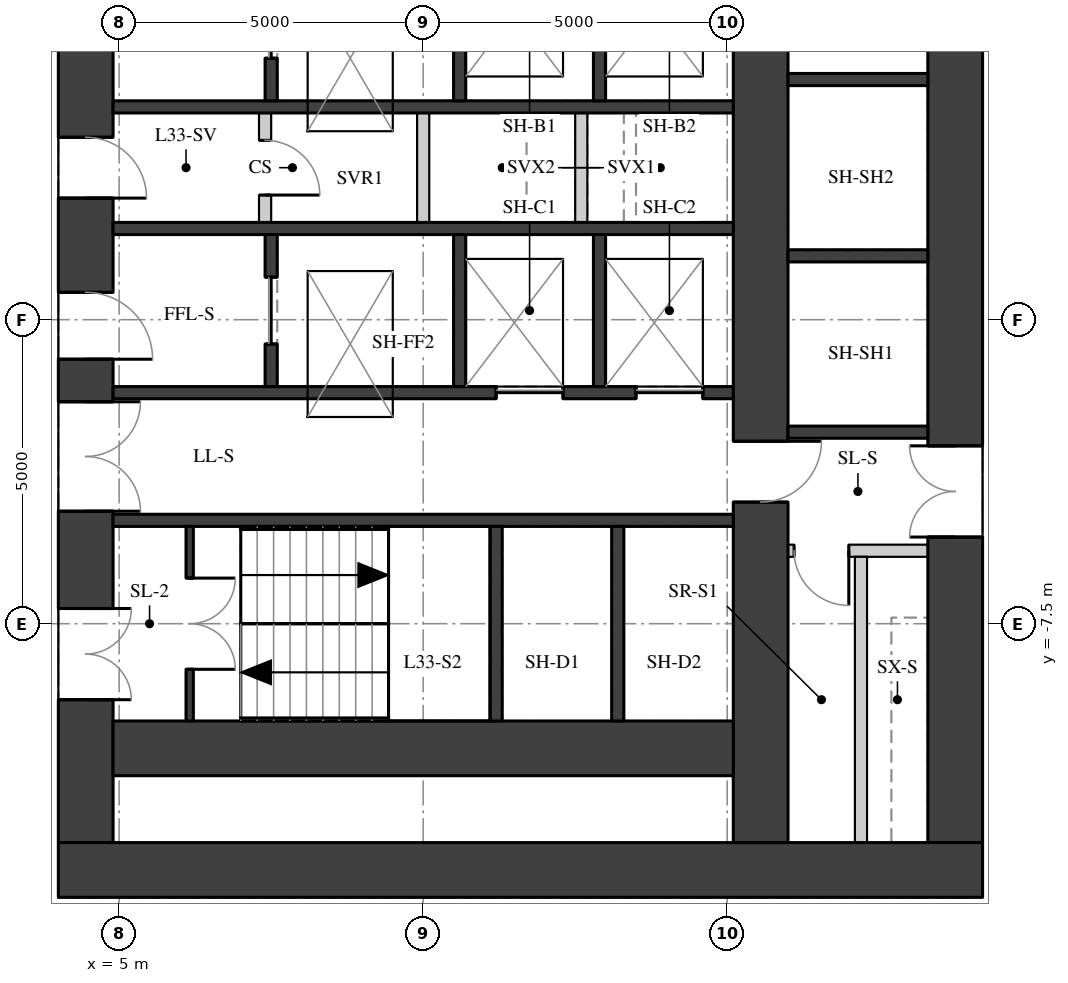
"""IFC4 building model, lengths in metres.
Left out: names, types, materials, properties, quantities, classifications, styles, units other than length and angle.
Written with IfcOpenShell. Run it as: python <this file> out.ifc"""

import sys

from ifc_helpers import new_model, si_unit, direction, frame, frame_2d, origin, place, context, subcontext, project, spatial, rectangle, extrude, element, fill, save


model = new_model("IFC4")
c1 = context("Model", 3, precision=1e-05, world=origin(), true_north=direction((0.0, 1.0)))
c2 = subcontext(c1, "Body", "Model", "MODEL_VIEW")
j1 = project(units=[si_unit("LENGTHUNIT", "METRE"), si_unit("PLANEANGLEUNIT", "RADIAN")], contexts=[c1])
p1 = place(None, origin())
s1 = spatial("IfcSite", under=j1, at=p1, CompositionType="ELEMENT")
p2 = place(p1, origin())
s2 = spatial("IfcBuilding", under=s1, at=p2, CompositionType="ELEMENT")
p3 = place(p2, frame((0.0, 0.0, 118.6)))
s3 = spatial("IfcBuildingStorey", under=s2, at=p3, CompositionType="ELEMENT", Elevation=118.6)
p4 = place(p3, frame((4.45, -11.1, 0.0), z_axis=(0.0, 0.0, 1.0), x_axis=(0.0, 1.0, 0.0)))
e1 = element("IfcWall", 1, at=p4, inside=s3, PredefinedType="SHEAR", context=c2, shape_type="SweptSolid", body=[
    extrude(rectangle(XDim=22.2, YDim=0.9, at=frame_2d((11.1, 0.0))), origin(), (0.0, 0.0, 1.0), 3.02),
])
p5 = place(p4, frame((2.35, 0.0, 0.0)))
e2 = element("IfcOpeningElement", 2, at=p5, cuts=e1, PredefinedType="OPENING", context=c2, shape_type="SweptSolid", body=[
    extrude(rectangle(XDim=1.5, YDim=2.1, at=frame_2d((0.75, 1.05))), frame((0.0, 0.46, 0.0), z_axis=(0.0, -1.0, 0.0), x_axis=(1.0, 0.0, 0.0)), (0.0, 0.0, 1.0), 0.92),
])
p6 = place(p4, frame((5.45, 0.0, 0.0)))
e3 = element("IfcOpeningElement", 3, at=p6, cuts=e1, PredefinedType="OPENING", context=c2, shape_type="SweptSolid", body=[
    extrude(rectangle(XDim=1.8, YDim=2.1, at=frame_2d((0.9, 1.05))), frame((0.0, 0.46, 0.0), z_axis=(0.0, -1.0, 0.0), x_axis=(1.0, 0.0, 0.0)), (0.0, 0.0, 1.0), 0.92),
])
p7 = place(p4, frame((7.95, 0.0, 0.0)))
e4 = element("IfcOpeningElement", 4, at=p7, cuts=e1, PredefinedType="OPENING", context=c2, shape_type="SweptSolid", body=[
    extrude(rectangle(XDim=1.1, YDim=2.1, at=frame_2d((0.55, 1.05))), frame((0.0, 0.46, 0.0), z_axis=(0.0, -1.0, 0.0), x_axis=(1.0, 0.0, 0.0)), (0.0, 0.0, 1.0), 0.92),
])
p8 = place(p4, frame((10.6, 0.0, 0.0)))
e5 = element("IfcOpeningElement", 5, at=p8, cuts=e1, PredefinedType="OPENING", context=c2, shape_type="SweptSolid", body=[
    extrude(rectangle(XDim=1.0, YDim=2.1, at=frame_2d((0.5, 1.05))), frame((0.0, 0.46, 0.0), z_axis=(0.0, -1.0, 0.0), x_axis=(1.0, 0.0, 0.0)), (0.0, 0.0, 1.0), 0.92),
])
p9 = place(p4, frame((13.15, 0.0, 0.0)))
e6 = element("IfcOpeningElement", 6, at=p9, cuts=e1, PredefinedType="OPENING", context=c2, shape_type="SweptSolid", body=[
    extrude(rectangle(XDim=1.1, YDim=2.1, at=frame_2d((0.55, 1.05))), frame((0.0, 0.46, 0.0), z_axis=(0.0, -1.0, 0.0), x_axis=(1.0, 0.0, 0.0)), (0.0, 0.0, 1.0), 0.92),
])
p10 = place(p4, frame((14.95, 0.0, 0.0)))
e7 = element("IfcOpeningElement", 7, at=p10, cuts=e1, PredefinedType="OPENING", context=c2, shape_type="SweptSolid", body=[
    extrude(rectangle(XDim=1.8, YDim=2.1, at=frame_2d((0.9, 1.05))), frame((0.0, 0.46, 0.0), z_axis=(0.0, -1.0, 0.0), x_axis=(1.0, 0.0, 0.0)), (0.0, 0.0, 1.0), 0.92),
])
p11 = place(p4, frame((18.35, 0.0, 0.0)))
e8 = element("IfcOpeningElement", 8, at=p11, cuts=e1, PredefinedType="OPENING", context=c2, shape_type="SweptSolid", body=[
    extrude(rectangle(XDim=1.5, YDim=2.1, at=frame_2d((0.75, 1.05))), frame((0.0, 0.46, 0.0), z_axis=(0.0, -1.0, 0.0), x_axis=(1.0, 0.0, 0.0)), (0.0, 0.0, 1.0), 0.92),
])
p12 = place(p3, frame((18.75, -11.1, 0.0), z_axis=(0.0, 0.0, 1.0), x_axis=(0.0, 1.0, 0.0)))
e9 = element("IfcWall", 9, at=p12, inside=s3, PredefinedType="SHEAR", context=c2, shape_type="SweptSolid", body=[
    extrude(rectangle(XDim=22.2, YDim=0.9, at=frame_2d((11.1, 0.0))), origin(), (0.0, 0.0, 1.0), 3.02),
])
p13 = place(p12, frame((16.175, 0.0, 0.0)))
e10 = element("IfcOpeningElement", 10, at=p13, cuts=e9, PredefinedType="OPENING", context=c2, shape_type="SweptSolid", body=[
    extrude(rectangle(XDim=1.5, YDim=2.1, at=frame_2d((0.75, 1.05))), frame((0.0, 0.46, 0.0), z_axis=(0.0, -1.0, 0.0), x_axis=(1.0, 0.0, 0.0)), (0.0, 0.0, 1.0), 0.92),
])
p14 = place(p12, frame((5.025, 0.0, 0.0)))
e11 = element("IfcOpeningElement", 11, at=p14, cuts=e9, PredefinedType="OPENING", context=c2, shape_type="SweptSolid", body=[
    extrude(rectangle(XDim=1.5, YDim=2.1, at=frame_2d((0.75, 1.05))), frame((0.0, 0.46, 0.0), z_axis=(0.0, -1.0, 0.0), x_axis=(1.0, 0.0, 0.0)), (0.0, 0.0, 1.0), 0.92),
])
p15 = place(p3, frame((4.0, -11.55, 0.0), z_axis=(0.0, 0.0, 1.0), x_axis=(1.0, 0.0, 0.0)))
e12 = element("IfcWall", 12, at=p15, inside=s3, PredefinedType="SHEAR", context=c2, shape_type="SweptSolid", body=[
    extrude(rectangle(XDim=15.2, YDim=0.9, at=frame_2d((7.6, 0.0))), origin(), (0.0, 0.0, 1.0), 3.02),
])
p16 = place(p3, frame((15.55, -11.1, 0.0), z_axis=(0.0, 0.0, 1.0), x_axis=(0.0, 1.0, 0.0)))
e13 = element("IfcWall", 13, at=p16, inside=s3, PredefinedType="SHEAR", context=c2, shape_type="SweptSolid", body=[
    extrude(rectangle(XDim=22.2, YDim=0.9, at=frame_2d((11.1, 0.0))), origin(), (0.0, 0.0, 1.0), 3.02),
])
p17 = place(p16, frame((15.6, 0.0, 0.0)))
e14 = element("IfcOpeningElement", 14, at=p17, cuts=e13, PredefinedType="OPENING", context=c2, shape_type="SweptSolid", body=[
    extrude(rectangle(XDim=1.0, YDim=2.1, at=frame_2d((0.5, 1.05))), frame((0.0, 0.46, 0.0), z_axis=(0.0, -1.0, 0.0), x_axis=(1.0, 0.0, 0.0)), (0.0, 0.0, 1.0), 0.92),
])
p18 = place(p16, frame((5.6, 0.0, 0.0)))
e15 = element("IfcOpeningElement", 15, at=p18, cuts=e13, PredefinedType="OPENING", context=c2, shape_type="SweptSolid", body=[
    extrude(rectangle(XDim=1.0, YDim=2.1, at=frame_2d((0.5, 1.05))), frame((0.0, 0.46, 0.0), z_axis=(0.0, -1.0, 0.0), x_axis=(1.0, 0.0, 0.0)), (0.0, 0.0, 1.0), 0.92),
])
p19 = place(p3, frame((4.9, -9.55, 0.0), z_axis=(0.0, 0.0, 1.0), x_axis=(1.0, 0.0, 0.0)))
e16 = element("IfcWall", 16, at=p19, inside=s3, PredefinedType="SHEAR", context=c2, shape_type="SweptSolid", body=[
    extrude(rectangle(XDim=10.2, YDim=0.9, at=frame_2d((5.1, 0.0))), origin(), (0.0, 0.0, 1.0), 3.02),
])
for number, where, z_axis, x_axis in (
    (17, (4.9, 1.0, 0.0), (0.0, 0.0, 1.0), (1.0, 0.0, 0.0)),
    (18, (4.9, -1.0, 0.0), (0.0, 0.0, 1.0), (1.0, 0.0, 0.0)),
):
    element("IfcWall", number, at=place(p3, frame(where, z_axis=z_axis, x_axis=x_axis)), inside=s3, PredefinedType="SHEAR", context=c2, shape_type="SweptSolid", body=[
        extrude(rectangle(XDim=10.2, YDim=0.2, at=frame_2d((5.1, 0.0))), origin(), (0.0, 0.0, 1.0), 3.02),
    ])
p20 = place(p3, frame((4.9, -3.7, 0.0), z_axis=(0.0, 0.0, 1.0), x_axis=(1.0, 0.0, 0.0)))
e19 = element("IfcWall", 19, at=p20, inside=s3, PredefinedType="SHEAR", context=c2, shape_type="SweptSolid", body=[
    extrude(rectangle(XDim=10.2, YDim=0.2, at=frame_2d((5.1, 0.0))), origin(), (0.0, 0.0, 1.0), 3.02),
])
p21 = place(p20, frame((6.3, 0.0, 0.0)))
e20 = element("IfcOpeningElement", 20, at=p21, cuts=e19, PredefinedType="OPENING", context=c2, shape_type="SweptSolid", body=[
    extrude(rectangle(XDim=1.1, YDim=2.1, at=frame_2d((0.55, 1.05))), frame((0.0, 0.11, 0.0), z_axis=(0.0, -1.0, 0.0), x_axis=(1.0, 0.0, 0.0)), (0.0, 0.0, 1.0), 0.22),
])
p22 = place(p20, frame((8.6, 0.0, 0.0)))
e21 = element("IfcOpeningElement", 21, at=p22, cuts=e19, PredefinedType="OPENING", context=c2, shape_type="SweptSolid", body=[
    extrude(rectangle(XDim=1.1, YDim=2.1, at=frame_2d((0.55, 1.05))), frame((0.0, 0.11, 0.0), z_axis=(0.0, -1.0, 0.0), x_axis=(1.0, 0.0, 0.0)), (0.0, 0.0, 1.0), 0.22),
])
p23 = place(p3, frame((4.9, -5.8, 0.0), z_axis=(0.0, 0.0, 1.0), x_axis=(1.0, 0.0, 0.0)))
e22 = element("IfcWall", 22, at=p23, inside=s3, PredefinedType="SHEAR", context=c2, shape_type="SweptSolid", body=[
    extrude(rectangle(XDim=10.2, YDim=0.2, at=frame_2d((5.1, 0.0))), origin(), (0.0, 0.0, 1.0), 3.02),
])
for number, where, z_axis, x_axis in (
    (23, (11.2, -9.1, 0.0), (0.0, 0.0, 1.0), (0.0, 1.0, 0.0)),
    (24, (13.2, -9.1, 0.0), (0.0, 0.0, 1.0), (0.0, 1.0, 0.0)),
):
    element("IfcWall", number, at=place(p3, frame(where, z_axis=z_axis, x_axis=x_axis)), inside=s3, PredefinedType="SHEAR", context=c2, shape_type="SweptSolid", body=[
        extrude(rectangle(XDim=3.2, YDim=0.2, at=frame_2d((1.6, 0.0))), origin(), (0.0, 0.0, 1.0), 3.02),
    ])
p24 = place(p3, frame((7.5, 1.1, 0.0), z_axis=(0.0, 0.0, 1.0), x_axis=(0.0, 1.0, 0.0)))
e25 = element("IfcWall", 25, at=p24, inside=s3, PredefinedType="SHEAR", context=c2, shape_type="SweptSolid", body=[
    extrude(rectangle(XDim=2.5, YDim=0.2, at=frame_2d((1.25, 0.0))), origin(), (0.0, 0.0, 1.0), 3.02),
])
p25 = place(p24, frame((0.7, 0.0, 0.0)))
e26 = element("IfcOpeningElement", 26, at=p25, cuts=e25, PredefinedType="OPENING", context=c2, shape_type="SweptSolid", body=[
    extrude(rectangle(XDim=1.1, YDim=2.1, at=frame_2d((0.55, 1.05))), frame((0.0, 0.11, 0.0), z_axis=(0.0, -1.0, 0.0), x_axis=(1.0, 0.0, 0.0)), (0.0, 0.0, 1.0), 0.22),
])
p26 = place(p3, frame((7.5, -3.6, 0.0), z_axis=(0.0, 0.0, 1.0), x_axis=(0.0, 1.0, 0.0)))
e27 = element("IfcWall", 27, at=p26, inside=s3, PredefinedType="SHEAR", context=c2, shape_type="SweptSolid", body=[
    extrude(rectangle(XDim=2.5, YDim=0.2, at=frame_2d((1.25, 0.0))), origin(), (0.0, 0.0, 1.0), 3.02),
])
p27 = place(p26, frame((0.7, 0.0, 0.0)))
e28 = element("IfcOpeningElement", 28, at=p27, cuts=e27, PredefinedType="OPENING", context=c2, shape_type="SweptSolid", body=[
    extrude(rectangle(XDim=1.1, YDim=2.1, at=frame_2d((0.55, 1.05))), frame((0.0, 0.11, 0.0), z_axis=(0.0, -1.0, 0.0), x_axis=(1.0, 0.0, 0.0)), (0.0, 0.0, 1.0), 0.22),
])
for number, where, z_axis, x_axis in (
    (29, (10.6, 1.1, 0.0), (0.0, 0.0, 1.0), (0.0, 1.0, 0.0)),
    (30, (10.6, -3.6, 0.0), (0.0, 0.0, 1.0), (0.0, 1.0, 0.0)),
    (31, (12.9, 1.1, 0.0), (0.0, 0.0, 1.0), (0.0, 1.0, 0.0)),
    (32, (12.9, -3.6, 0.0), (0.0, 0.0, 1.0), (0.0, 1.0, 0.0)),
):
    element("IfcWall", number, at=place(p3, frame(where, z_axis=z_axis, x_axis=x_axis)), inside=s3, PredefinedType="SHEAR", context=c2, shape_type="SweptSolid", body=[
        extrude(rectangle(XDim=2.5, YDim=0.2, at=frame_2d((1.25, 0.0))), origin(), (0.0, 0.0, 1.0), 3.02),
    ])
p28 = place(p3, frame((6.16, -9.1, 0.0), z_axis=(0.0, 0.0, 1.0), x_axis=(0.0, 1.0, 0.0)))
e33 = element("IfcWall", 33, at=p28, inside=s3, PredefinedType="SHEAR", context=c2, shape_type="SweptSolid", body=[
    extrude(rectangle(XDim=3.2, YDim=0.12, at=frame_2d((1.6, 0.0))), origin(), (0.0, 0.0, 1.0), 3.02),
])
p29 = place(p28, frame((0.85, 0.0, 0.0)))
e34 = element("IfcOpeningElement", 34, at=p29, cuts=e33, PredefinedType="OPENING", context=c2, shape_type="SweptSolid", body=[
    extrude(rectangle(XDim=1.5, YDim=2.1, at=frame_2d((0.75, 1.05))), frame((0.0, 0.07, 0.0), z_axis=(0.0, -1.0, 0.0), x_axis=(1.0, 0.0, 0.0)), (0.0, 0.0, 1.0), 0.14),
])
p30 = place(p3, frame((7.4, -0.9, 0.0), z_axis=(0.0, 0.0, 1.0), x_axis=(0.0, 1.0, 0.0)))
e35 = element("IfcWall", 35, at=p30, inside=s3, PredefinedType="PARTITIONING", context=c2, shape_type="SweptSolid", body=[
    extrude(rectangle(XDim=1.8, YDim=0.2, at=frame_2d((0.9, 0.0))), origin(), (0.0, 0.0, 1.0), 3.02),
])
p31 = place(p30, frame((0.45, 0.0, 0.0)))
e36 = element("IfcOpeningElement", 36, at=p31, cuts=e35, PredefinedType="OPENING", context=c2, shape_type="SweptSolid", body=[
    extrude(rectangle(XDim=0.9, YDim=2.1, at=frame_2d((0.45, 1.05))), frame((0.0, 0.11, 0.0), z_axis=(0.0, -1.0, 0.0), x_axis=(1.0, 0.0, 0.0)), (0.0, 0.0, 1.0), 0.22),
])
for number, where, z_axis, x_axis in (
    (37, (10.0, -0.9, 0.0), (0.0, 0.0, 1.0), (0.0, 1.0, 0.0)),
    (38, (12.6, -0.9, 0.0), (0.0, 0.0, 1.0), (0.0, 1.0, 0.0)),
):
    element("IfcWall", number, at=place(p3, frame(where, z_axis=z_axis, x_axis=x_axis)), inside=s3, PredefinedType="PARTITIONING", context=c2, shape_type="SweptSolid", body=[
        extrude(rectangle(XDim=1.8, YDim=0.2, at=frame_2d((0.9, 0.0))), origin(), (0.0, 0.0, 1.0), 3.02),
    ])
for number, where, z_axis, x_axis in (
    (39, (16.0, -4.35, 0.0), (0.0, 0.0, 1.0), (1.0, 0.0, 0.0)),
    (40, (16.0, -1.45, 0.0), (0.0, 0.0, 1.0), (1.0, 0.0, 0.0)),
    (41, (16.0, 1.45, 0.0), (0.0, 0.0, 1.0), (1.0, 0.0, 0.0)),
):
    element("IfcWall", number, at=place(p3, frame(where, z_axis=z_axis, x_axis=x_axis)), inside=s3, PredefinedType="SHEAR", context=c2, shape_type="SweptSolid", body=[
        extrude(rectangle(XDim=2.3, YDim=0.2, at=frame_2d((1.15, 0.0))), origin(), (0.0, 0.0, 1.0), 3.02),
    ])
p32 = place(p3, frame((16.0, -6.3, 0.0), z_axis=(0.0, 0.0, 1.0), x_axis=(1.0, 0.0, 0.0)))
e42 = element("IfcWall", 42, at=p32, inside=s3, PredefinedType="PARTITIONING", context=c2, shape_type="SweptSolid", body=[
    extrude(rectangle(XDim=2.3, YDim=0.2, at=frame_2d((1.15, 0.0))), origin(), (0.0, 0.0, 1.0), 3.02),
])
p33 = place(p32, frame((0.1, 0.0, 0.0)))
e43 = element("IfcOpeningElement", 43, at=p33, cuts=e42, PredefinedType="OPENING", context=c2, shape_type="SweptSolid", body=[
    extrude(rectangle(XDim=0.9, YDim=2.1, at=frame_2d((0.45, 1.05))), frame((0.0, 0.11, 0.0), z_axis=(0.0, -1.0, 0.0), x_axis=(1.0, 0.0, 0.0)), (0.0, 0.0, 1.0), 0.22),
])
p34 = place(p3, frame((17.2, -11.1, 0.0), z_axis=(0.0, 0.0, 1.0), x_axis=(0.0, 1.0, 0.0)))
e44 = element("IfcWall", 44, at=p34, inside=s3, PredefinedType="PARTITIONING", context=c2, shape_type="SweptSolid", body=[
    extrude(rectangle(XDim=4.7, YDim=0.2, at=frame_2d((2.35, 0.0))), origin(), (0.0, 0.0, 1.0), 3.02),
])
p35 = place(p5, origin())
e45 = element("IfcDoor", 45, at=p35, inside=s3, OperationType="DOUBLE_DOOR_SINGLE_SWING", PredefinedType="DOOR", context=c2, shape_type="SweptSolid", body=[
    extrude(rectangle(XDim=1.5, YDim=2.1, at=frame_2d((0.75, 1.05))), frame((0.0, 0.025, 0.0), z_axis=(0.0, -1.0, 0.0), x_axis=(1.0, 0.0, 0.0)), (0.0, 0.0, 1.0), 0.05),
])
fill(e2, e45)
p36 = place(p6, origin())
e46 = element("IfcDoor", 46, at=p36, inside=s3, OperationType="DOUBLE_DOOR_SINGLE_SWING", PredefinedType="DOOR", context=c2, shape_type="SweptSolid", body=[
    extrude(rectangle(XDim=1.8, YDim=2.1, at=frame_2d((0.9, 1.05))), frame((0.0, 0.025, 0.0), z_axis=(0.0, -1.0, 0.0), x_axis=(1.0, 0.0, 0.0)), (0.0, 0.0, 1.0), 0.05),
])
fill(e3, e46)
p37 = place(p7, origin())
e47 = element("IfcDoor", 47, at=p37, inside=s3, OperationType="SINGLE_SWING_RIGHT", PredefinedType="DOOR", context=c2, shape_type="SweptSolid", body=[
    extrude(rectangle(XDim=1.1, YDim=2.1, at=frame_2d((0.55, 1.05))), frame((0.0, 0.025, 0.0), z_axis=(0.0, -1.0, 0.0), x_axis=(1.0, 0.0, 0.0)), (0.0, 0.0, 1.0), 0.05),
])
fill(e4, e47)
p38 = place(p8, origin())
e48 = element("IfcDoor", 48, at=p38, inside=s3, OperationType="SINGLE_SWING_RIGHT", PredefinedType="DOOR", context=c2, shape_type="SweptSolid", body=[
    extrude(rectangle(XDim=1.0, YDim=2.1, at=frame_2d((0.5, 1.05))), frame((0.0, 0.025, 0.0), z_axis=(0.0, -1.0, 0.0), x_axis=(1.0, 0.0, 0.0)), (0.0, 0.0, 1.0), 0.05),
])
fill(e5, e48)
p39 = place(p14, origin())
e49 = element("IfcDoor", 49, at=p39, inside=s3, OperationType="DOUBLE_DOOR_SINGLE_SWING", PredefinedType="DOOR", context=c2, shape_type="SweptSolid", body=[
    extrude(rectangle(XDim=1.5, YDim=2.1, at=frame_2d((0.75, 1.05))), frame((0.0, 0.025, 0.0), z_axis=(0.0, -1.0, 0.0), x_axis=(1.0, 0.0, 0.0)), (0.0, 0.0, 1.0), 0.05),
])
fill(e11, e49)
p40 = place(p29, origin())
e50 = element("IfcDoor", 50, at=p40, inside=s3, OperationType="DOUBLE_DOOR_SINGLE_SWING", PredefinedType="DOOR", context=c2, shape_type="SweptSolid", body=[
    extrude(rectangle(XDim=1.5, YDim=2.1, at=frame_2d((0.75, 1.05))), frame((0.0, 0.025, 0.0), z_axis=(0.0, -1.0, 0.0), x_axis=(1.0, 0.0, 0.0)), (0.0, 0.0, 1.0), 0.05),
])
fill(e34, e50)
p41 = place(p21, origin())
e51 = element("IfcDoor", 51, at=p41, inside=s3, OperationType="DOUBLE_DOOR_SLIDING", PredefinedType="DOOR", context=c2, shape_type="SweptSolid", body=[
    extrude(rectangle(XDim=1.1, YDim=2.1, at=frame_2d((0.55, 1.05))), frame((0.0, 0.025, 0.0), z_axis=(0.0, -1.0, 0.0), x_axis=(1.0, 0.0, 0.0)), (0.0, 0.0, 1.0), 0.05),
])
fill(e20, e51)
p42 = place(p22, origin())
e52 = element("IfcDoor", 52, at=p42, inside=s3, OperationType="DOUBLE_DOOR_SLIDING", PredefinedType="DOOR", context=c2, shape_type="SweptSolid", body=[
    extrude(rectangle(XDim=1.1, YDim=2.1, at=frame_2d((0.55, 1.05))), frame((0.0, 0.025, 0.0), z_axis=(0.0, -1.0, 0.0), x_axis=(1.0, 0.0, 0.0)), (0.0, 0.0, 1.0), 0.05),
])
fill(e21, e52)
p43 = place(p25, origin())
e53 = element("IfcDoor", 53, at=p43, inside=s3, OperationType="DOUBLE_DOOR_SLIDING", PredefinedType="DOOR", context=c2, shape_type="SweptSolid", body=[
    extrude(rectangle(XDim=1.1, YDim=2.1, at=frame_2d((0.55, 1.05))), frame((0.0, 0.025, 0.0), z_axis=(0.0, -1.0, 0.0), x_axis=(1.0, 0.0, 0.0)), (0.0, 0.0, 1.0), 0.05),
])
fill(e26, e53)
p44 = place(p27, origin())
e54 = element("IfcDoor", 54, at=p44, inside=s3, OperationType="DOUBLE_DOOR_SLIDING", PredefinedType="DOOR", context=c2, shape_type="SweptSolid", body=[
    extrude(rectangle(XDim=1.1, YDim=2.1, at=frame_2d((0.55, 1.05))), frame((0.0, 0.025, 0.0), z_axis=(0.0, -1.0, 0.0), x_axis=(1.0, 0.0, 0.0)), (0.0, 0.0, 1.0), 0.05),
])
fill(e28, e54)
p45 = place(p31, origin())
e55 = element("IfcDoor", 55, at=p45, inside=s3, OperationType="SINGLE_SWING_RIGHT", PredefinedType="DOOR", context=c2, shape_type="SweptSolid", body=[
    extrude(rectangle(XDim=0.9, YDim=2.1, at=frame_2d((0.45, 1.05))), frame((0.0, 0.025, 0.0), z_axis=(0.0, -1.0, 0.0), x_axis=(1.0, 0.0, 0.0)), (0.0, 0.0, 1.0), 0.05),
])
fill(e36, e55)
p46 = place(p18, origin())
e56 = element("IfcDoor", 56, at=p46, inside=s3, OperationType="SINGLE_SWING_LEFT", PredefinedType="DOOR", context=c2, shape_type="SweptSolid", body=[
    extrude(rectangle(XDim=1.0, YDim=2.1, at=frame_2d((0.5, 1.05))), frame((0.0, 0.025, 0.0), z_axis=(0.0, -1.0, 0.0), x_axis=(1.0, 0.0, 0.0)), (0.0, 0.0, 1.0), 0.05),
])
fill(e15, e56)
p47 = place(p33, origin())
e57 = element("IfcDoor", 57, at=p47, inside=s3, OperationType="SINGLE_SWING_LEFT", PredefinedType="DOOR", context=c2, shape_type="SweptSolid", body=[
    extrude(rectangle(XDim=0.9, YDim=2.1, at=frame_2d((0.45, 1.05))), frame((0.0, 0.025, 0.0), z_axis=(0.0, -1.0, 0.0), x_axis=(1.0, 0.0, 0.0)), (0.0, 0.0, 1.0), 0.05),
])
fill(e43, e57)
save(model, sys.argv[1])
